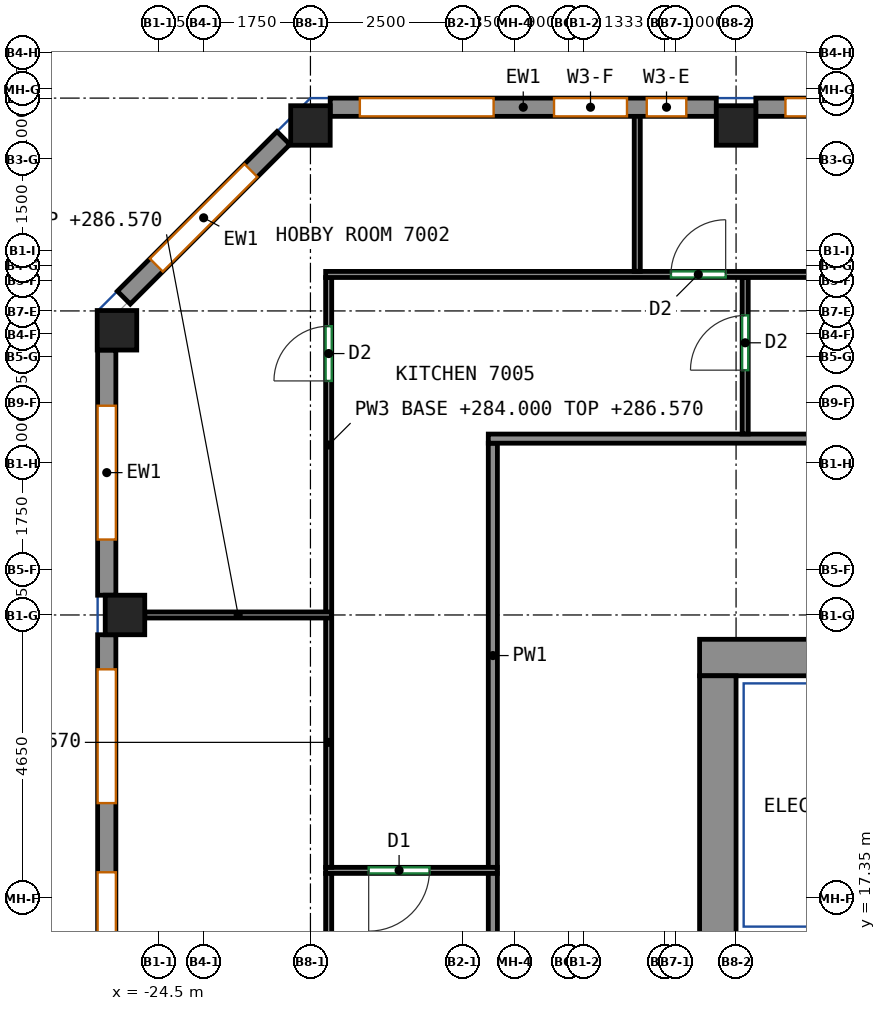
"""IFC4 building model, lengths in metres.
Left out: names, types, materials, properties, quantities, classifications, styles, units other than length and angle.
Written with IfcOpenShell. Run it as: python <this file> out.ifc"""

import sys

from ifc_helpers import new_model, si_unit, direction, frame, frame_2d, origin, origin_2d, place, context, subcontext, project, spatial, rectangle, extrude, source, transform, mapped, element, fill, save


model = new_model("IFC4")
c1 = context("Model", 3, precision=1e-05, world=origin(), true_north=direction((0.0, 1.0)))
c2 = subcontext(c1, "Body", "Model", "MODEL_VIEW")
j1 = project(units=[si_unit("LENGTHUNIT", "METRE"), si_unit("PLANEANGLEUNIT", "RADIAN")], contexts=[c1])
p1 = place(None, origin())
s1 = spatial("IfcSite", under=j1, at=p1, CompositionType="ELEMENT")
p2 = place(p1, origin())
s2 = spatial("IfcBuilding", under=s1, at=p2, CompositionType="ELEMENT")
p3 = place(p2, frame((0.0, 0.0, 284.0)))
s3 = spatial("IfcBuildingStorey", under=s2, at=p3, CompositionType="ELEMENT", Elevation=284.0)
m1 = source(origin(), c2, "Body", "SweptSolid", [
    extrude(rectangle(XDim=0.65, YDim=0.65, at=origin_2d()), origin(), (0.0, 0.0, 1.0), 3.12),
])
for number, where, z_axis, x_axis in (
    (1, (-25.182, 26.682, 0.0), (0.0, 0.0, 1.0), (1.0, 0.0, 0.0)),
    (2, (-25.05, 22.0, 0.0), (0.0, 0.0, 1.0), (1.0, 0.0, 0.0)),
    (3, (-22.0, 30.05, 0.0), (0.0, 0.0, 1.0), (1.0, 0.0, 0.0)),
    (4, (-15.0, 30.05, 0.0), (0.0, 0.0, 1.0), (1.0, 0.0, 0.0)),
):
    element("IfcColumn", number, at=place(p3, frame(where, z_axis=z_axis, x_axis=x_axis)), inside=s3, PredefinedType="COLUMN", context=c2, shape_type="MappedRepresentation", body=[
        mapped(m1, transform((0.0, 0.0, 0.0))),
    ])
m2 = source(origin(), c2, "Body", "SweptSolid", [
    extrude(rectangle(XDim=33.3, YDim=0.6, at=frame_2d((16.65, 0.0))), origin(), (0.0, 0.0, 1.0), 3.12),
])
p4 = place(p3, frame((-15.6, 21.3, 0.0), z_axis=(0.0, 0.0, 1.0), x_axis=(1.0, 0.0, 0.0)))
e5 = element("IfcWall", 5, at=p4, inside=s3, PredefinedType="SHEAR", context=c2, shape_type="MappedRepresentation", body=[
    mapped(m2, transform((0.0, 0.0, 0.0))),
])
p5 = place(p4, frame((6.431, 0.0, 0.0)))
e6 = element("IfcOpeningElement", 6, at=p5, cuts=e5, PredefinedType="OPENING", context=c2, shape_type="SweptSolid", body=[
    extrude(rectangle(XDim=0.9, YDim=2.1, at=frame_2d((0.45, 1.05))), frame((0.0, 0.31, 0.0), z_axis=(0.0, -1.0, 0.0), x_axis=(1.0, 0.0, 0.0)), (0.0, 0.0, 1.0), 0.62),
])
p6 = place(p4, frame((11.738, 0.0, 0.0)))
e7 = element("IfcOpeningElement", 7, at=p6, cuts=e5, PredefinedType="OPENING", context=c2, shape_type="SweptSolid", body=[
    extrude(rectangle(XDim=0.9, YDim=2.1, at=frame_2d((0.45, 1.05))), frame((0.0, 0.31, 0.0), z_axis=(0.0, -1.0, 0.0), x_axis=(1.0, 0.0, 0.0)), (0.0, 0.0, 1.0), 0.62),
])
p7 = place(p4, frame((17.165, 0.0, 0.0)))
e8 = element("IfcOpeningElement", 8, at=p7, cuts=e5, PredefinedType="OPENING", context=c2, shape_type="SweptSolid", body=[
    extrude(rectangle(XDim=0.9, YDim=2.1, at=frame_2d((0.45, 1.05))), frame((0.0, 0.31, 0.0), z_axis=(0.0, -1.0, 0.0), x_axis=(1.0, 0.0, 0.0)), (0.0, 0.0, 1.0), 0.62),
])
p8 = place(p4, frame((21.386, 0.0, 0.0)))
e9 = element("IfcOpeningElement", 9, at=p8, cuts=e5, PredefinedType="OPENING", context=c2, shape_type="SweptSolid", body=[
    extrude(rectangle(XDim=0.9, YDim=2.1, at=frame_2d((0.45, 1.05))), frame((0.0, 0.31, 0.0), z_axis=(0.0, -1.0, 0.0), x_axis=(1.0, 0.0, 0.0)), (0.0, 0.0, 1.0), 0.62),
])
p9 = place(p4, frame((24.387, 0.0, 0.0)))
e10 = element("IfcOpeningElement", 10, at=p9, cuts=e5, PredefinedType="OPENING", context=c2, shape_type="SweptSolid", body=[
    extrude(rectangle(XDim=0.9, YDim=2.1, at=frame_2d((0.45, 1.05))), frame((0.0, 0.31, 0.0), z_axis=(0.0, -1.0, 0.0), x_axis=(1.0, 0.0, 0.0)), (0.0, 0.0, 1.0), 0.62),
])
p10 = place(p4, frame((26.92, 0.0, 0.0)))
e11 = element("IfcOpeningElement", 11, at=p10, cuts=e5, PredefinedType="OPENING", context=c2, shape_type="SweptSolid", body=[
    extrude(rectangle(XDim=0.9, YDim=2.1, at=frame_2d((0.45, 1.05))), frame((0.0, 0.31, 0.0), z_axis=(0.0, -1.0, 0.0), x_axis=(1.0, 0.0, 0.0)), (0.0, 0.0, 1.0), 0.62),
])
p11 = place(p4, frame((2.125, 0.0, 0.0)))
e12 = element("IfcOpeningElement", 12, at=p11, cuts=e5, PredefinedType="OPENING", context=c2, shape_type="SweptSolid", body=[
    extrude(rectangle(XDim=0.9, YDim=2.1, at=frame_2d((0.45, 1.05))), frame((0.0, 0.31, 0.0), z_axis=(0.0, -1.0, 0.0), x_axis=(1.0, 0.0, 0.0)), (0.0, 0.0, 1.0), 0.62),
])
p12 = place(p4, frame((30.275, 0.0, 0.0)))
e13 = element("IfcOpeningElement", 13, at=p12, cuts=e5, PredefinedType="OPENING", context=c2, shape_type="SweptSolid", body=[
    extrude(rectangle(XDim=0.9, YDim=2.1, at=frame_2d((0.45, 1.05))), frame((0.0, 0.31, 0.0), z_axis=(0.0, -1.0, 0.0), x_axis=(1.0, 0.0, 0.0)), (0.0, 0.0, 1.0), 0.62),
])
m3 = source(origin(), c2, "Body", "SweptSolid", [
    extrude(rectangle(XDim=12.0, YDim=0.6, at=frame_2d((6.0, 0.0))), origin(), (0.0, 0.0, 1.0), 3.12),
])
p13 = place(p3, frame((-15.3, 9.0, 0.0), z_axis=(0.0, 0.0, 1.0), x_axis=(0.0, 1.0, 0.0)))
e14 = element("IfcWall", 14, at=p13, inside=s3, PredefinedType="SHEAR", context=c2, shape_type="MappedRepresentation", body=[
    mapped(m3, transform((0.0, 0.0, 0.0))),
])
m4 = source(origin(), c2, "Body", "SweptSolid", [
    extrude(rectangle(XDim=6.35, YDim=0.3, at=frame_2d((3.175, 0.0))), origin(), (0.0, 0.0, 1.0), 3.12),
])
p14 = place(p3, frame((-8.325, 30.35, 0.0), z_axis=(0.0, 0.0, 1.0), x_axis=(-1.0, 0.0, 0.0)))
e15 = element("IfcWall", 15, at=p14, inside=s3, PredefinedType="SOLIDWALL", context=c2, shape_type="MappedRepresentation", body=[
    mapped(m4, transform((0.0, 0.0, 0.0))),
])
p15 = place(p14, frame((0.488, 0.0, 0.8)))
e16 = element("IfcOpeningElement", 16, at=p15, cuts=e15, PredefinedType="OPENING", context=c2, shape_type="SweptSolid", body=[
    extrude(rectangle(XDim=2.2, YDim=2.05, at=frame_2d((1.1, 1.025))), frame((0.0, 0.16, 0.0), z_axis=(0.0, -1.0, 0.0), x_axis=(1.0, 0.0, 0.0)), (0.0, 0.0, 1.0), 0.32),
])
p16 = place(p14, frame((3.663, 0.0, 0.8)))
e17 = element("IfcOpeningElement", 17, at=p16, cuts=e15, PredefinedType="OPENING", context=c2, shape_type="SweptSolid", body=[
    extrude(rectangle(XDim=2.2, YDim=2.05, at=frame_2d((1.1, 1.025))), frame((0.0, 0.16, 0.0), z_axis=(0.0, -1.0, 0.0), x_axis=(1.0, 0.0, 0.0)), (0.0, 0.0, 1.0), 0.32),
])
p17 = place(p3, frame((-15.325, 30.35, 0.0), z_axis=(0.0, 0.0, 1.0), x_axis=(-1.0, 0.0, 0.0)))
e18 = element("IfcWall", 18, at=p17, inside=s3, PredefinedType="SOLIDWALL", context=c2, shape_type="MappedRepresentation", body=[
    mapped(m4, transform((0.0, 0.0, 0.0))),
])
p18 = place(p17, frame((0.494, 0.0, 0.8)))
e19 = element("IfcOpeningElement", 19, at=p18, cuts=e18, PredefinedType="OPENING", context=c2, shape_type="SweptSolid", body=[
    extrude(rectangle(XDim=0.65, YDim=2.05, at=frame_2d((0.325, 1.025))), frame((0.0, 0.16, 0.0), z_axis=(0.0, -1.0, 0.0), x_axis=(1.0, 0.0, 0.0)), (0.0, 0.0, 1.0), 0.32),
])
p19 = place(p17, frame((3.663, 0.0, 0.8)))
e20 = element("IfcOpeningElement", 20, at=p19, cuts=e18, PredefinedType="OPENING", context=c2, shape_type="SweptSolid", body=[
    extrude(rectangle(XDim=2.2, YDim=2.05, at=frame_2d((1.1, 1.025))), frame((0.0, 0.16, 0.0), z_axis=(0.0, -1.0, 0.0), x_axis=(1.0, 0.0, 0.0)), (0.0, 0.0, 1.0), 0.32),
])
p20 = place(p17, frame((1.469, 0.0, 0.8)))
e21 = element("IfcOpeningElement", 21, at=p20, cuts=e18, PredefinedType="OPENING", context=c2, shape_type="SweptSolid", body=[
    extrude(rectangle(XDim=1.2, YDim=2.05, at=frame_2d((0.6, 1.025))), frame((0.0, 0.16, 0.0), z_axis=(0.0, -1.0, 0.0), x_axis=(1.0, 0.0, 0.0)), (0.0, 0.0, 1.0), 0.32),
])
m5 = source(origin(), c2, "Body", "SweptSolid", [
    extrude(rectangle(XDim=3.712, YDim=0.3, at=frame_2d((1.856, 0.0))), origin(), (0.0, 0.0, 1.0), 3.12),
])
p21 = place(p3, frame((-22.444, 29.844, 0.0), z_axis=(0.0, 0.0, 1.0), x_axis=(-0.707106781187, -0.707106781187, 0.0)))
e22 = element("IfcWall", 22, at=p21, inside=s3, PredefinedType="SOLIDWALL", context=c2, shape_type="MappedRepresentation", body=[
    mapped(m5, transform((0.0, 0.0, 0.0))),
])
p22 = place(p21, frame((0.756, 0.0, 0.8)))
e23 = element("IfcOpeningElement", 23, at=p22, cuts=e22, PredefinedType="OPENING", context=c2, shape_type="SweptSolid", body=[
    extrude(rectangle(XDim=2.2, YDim=2.05, at=frame_2d((1.1, 1.025))), frame((0.0, 0.16, 0.0), z_axis=(0.0, -1.0, 0.0), x_axis=(1.0, 0.0, 0.0)), (0.0, 0.0, 1.0), 0.32),
])
m6 = source(origin(), c2, "Body", "SweptSolid", [
    extrude(rectangle(XDim=4.032, YDim=0.3, at=frame_2d((2.016, 0.0))), origin(), (0.0, 0.0, 1.0), 3.12),
])
p23 = place(p3, frame((-25.35, 26.357, 0.0), z_axis=(0.0, 0.0, 1.0), x_axis=(0.0, -1.0, 0.0)))
e24 = element("IfcWall", 24, at=p23, inside=s3, PredefinedType="SOLIDWALL", context=c2, shape_type="MappedRepresentation", body=[
    mapped(m6, transform((0.0, 0.0, 0.0))),
])
p24 = place(p23, frame((0.916, 0.0, 0.8)))
e25 = element("IfcOpeningElement", 25, at=p24, cuts=e24, PredefinedType="OPENING", context=c2, shape_type="SweptSolid", body=[
    extrude(rectangle(XDim=2.2, YDim=2.05, at=frame_2d((1.1, 1.025))), frame((0.0, 0.16, 0.0), z_axis=(0.0, -1.0, 0.0), x_axis=(1.0, 0.0, 0.0)), (0.0, 0.0, 1.0), 0.32),
])
m7 = source(origin(), c2, "Body", "SweptSolid", [
    extrude(rectangle(XDim=13.35, YDim=0.3, at=frame_2d((6.675, 0.0))), origin(), (0.0, 0.0, 1.0), 3.12),
])
p25 = place(p3, frame((-25.35, 21.675, 0.0), z_axis=(0.0, 0.0, 1.0), x_axis=(0.0, -1.0, 0.0)))
e26 = element("IfcWall", 26, at=p25, inside=s3, PredefinedType="SOLIDWALL", context=c2, shape_type="MappedRepresentation", body=[
    mapped(m7, transform((0.0, 0.0, 0.0))),
])
p26 = place(p25, frame((0.569, 0.0, 0.8)))
e27 = element("IfcOpeningElement", 27, at=p26, cuts=e26, PredefinedType="OPENING", context=c2, shape_type="SweptSolid", body=[
    extrude(rectangle(XDim=2.2, YDim=2.05, at=frame_2d((1.1, 1.025))), frame((0.0, 0.16, 0.0), z_axis=(0.0, -1.0, 0.0), x_axis=(1.0, 0.0, 0.0)), (0.0, 0.0, 1.0), 0.32),
])
p27 = place(p25, frame((3.906, 0.0, 0.8)))
e28 = element("IfcOpeningElement", 28, at=p27, cuts=e26, PredefinedType="OPENING", context=c2, shape_type="SweptSolid", body=[
    extrude(rectangle(XDim=2.2, YDim=2.05, at=frame_2d((1.1, 1.025))), frame((0.0, 0.16, 0.0), z_axis=(0.0, -1.0, 0.0), x_axis=(1.0, 0.0, 0.0)), (0.0, 0.0, 1.0), 0.32),
])
p28 = place(p25, frame((7.244, 0.0, 0.8)))
e29 = element("IfcOpeningElement", 29, at=p28, cuts=e26, PredefinedType="OPENING", context=c2, shape_type="SweptSolid", body=[
    extrude(rectangle(XDim=2.2, YDim=2.05, at=frame_2d((1.1, 1.025))), frame((0.0, 0.16, 0.0), z_axis=(0.0, -1.0, 0.0), x_axis=(1.0, 0.0, 0.0)), (0.0, 0.0, 1.0), 0.32),
])
p29 = place(p25, frame((10.581, 0.0, 0.8)))
e30 = element("IfcOpeningElement", 30, at=p29, cuts=e26, PredefinedType="OPENING", context=c2, shape_type="SweptSolid", body=[
    extrude(rectangle(XDim=2.2, YDim=2.05, at=frame_2d((1.1, 1.025))), frame((0.0, 0.16, 0.0), z_axis=(0.0, -1.0, 0.0), x_axis=(1.0, 0.0, 0.0)), (0.0, 0.0, 1.0), 0.32),
])
p30 = place(p3, frame((-19.0, 8.09, 0.0), z_axis=(0.0, 0.0, 1.0), x_axis=(0.0, 1.0, 0.0)))
e31 = element("IfcWall", 31, at=p30, inside=s3, PredefinedType="PARTITIONING", context=c2, shape_type="SweptSolid", body=[
    extrude(rectangle(XDim=9.67, YDim=0.15, at=frame_2d((4.835, 0.0))), origin(), (0.0, 0.0, 1.0), 3.12),
])
p31 = place(p30, frame((3.629, 0.0, 0.0)))
e32 = element("IfcOpeningElement", 32, at=p31, cuts=e31, PredefinedType="OPENING", context=c2, shape_type="SweptSolid", body=[
    extrude(rectangle(XDim=1.0, YDim=2.1, at=frame_2d((0.5, 1.05))), frame((0.0, 0.085, 0.0), z_axis=(0.0, -1.0, 0.0), x_axis=(1.0, 0.0, 0.0)), (0.0, 0.0, 1.0), 0.17),
])
p32 = place(p3, frame((-19.0, 17.84, 0.0), z_axis=(0.0, 0.0, 1.0), x_axis=(0.0, 1.0, 0.0)))
e33 = element("IfcWall", 33, at=p32, inside=s3, PredefinedType="PARTITIONING", context=c2, shape_type="SweptSolid", body=[
    extrude(rectangle(XDim=6.985, YDim=0.15, at=frame_2d((3.492, 0.0))), origin(), (0.0, 0.0, 1.0), 3.12),
])
p33 = place(p3, frame((-19.075, 24.9, 0.0), z_axis=(0.0, 0.0, 1.0), x_axis=(1.0, 0.0, 0.0)))
e34 = element("IfcWall", 34, at=p33, inside=s3, PredefinedType="PARTITIONING", context=c2, shape_type="SweptSolid", body=[
    extrude(rectangle(XDim=39.75, YDim=0.15, at=frame_2d((19.875, 0.0))), origin(), (0.0, 0.0, 1.0), 3.12),
])
p34 = place(p33, frame((11.365, 0.0, 0.0)))
e35 = element("IfcOpeningElement", 35, at=p34, cuts=e34, PredefinedType="OPENING", context=c2, shape_type="SweptSolid", body=[
    extrude(rectangle(XDim=1.0, YDim=2.1, at=frame_2d((0.5, 1.05))), frame((0.0, 0.085, 0.0), z_axis=(0.0, -1.0, 0.0), x_axis=(1.0, 0.0, 0.0)), (0.0, 0.0, 1.0), 0.17),
])
p35 = place(p33, frame((33.379, 0.0, 0.0)))
e36 = element("IfcOpeningElement", 36, at=p35, cuts=e34, PredefinedType="OPENING", context=c2, shape_type="SweptSolid", body=[
    extrude(rectangle(XDim=0.9, YDim=2.1, at=frame_2d((0.45, 1.05))), frame((0.0, 0.085, 0.0), z_axis=(0.0, -1.0, 0.0), x_axis=(1.0, 0.0, 0.0)), (0.0, 0.0, 1.0), 0.17),
])
p36 = place(p3, frame((-18.927, 17.8, 0.0), z_axis=(0.0, 0.0, 1.0), x_axis=(-1.0, 0.0, 0.0)))
e37 = element("IfcWall", 37, at=p36, inside=s3, PredefinedType="PARTITIONING", context=c2, shape_type="SweptSolid", body=[
    extrude(rectangle(XDim=2.823, YDim=0.1, at=frame_2d((1.412, 0.0))), origin(), (0.0, 0.0, 1.0), 3.12),
])
p37 = place(p36, frame((1.115, 0.0, 0.0)))
e38 = element("IfcOpeningElement", 38, at=p37, cuts=e37, PredefinedType="OPENING", context=c2, shape_type="SweptSolid", body=[
    extrude(rectangle(XDim=1.0, YDim=2.1, at=frame_2d((0.5, 1.05))), frame((0.0, 0.06, 0.0), z_axis=(0.0, -1.0, 0.0), x_axis=(1.0, 0.0, 0.0)), (0.0, 0.0, 1.0), 0.12),
])
p38 = place(p3, frame((-21.7, 8.1, 0.0), z_axis=(0.0, 0.0, 1.0), x_axis=(0.0, 1.0, 0.0)))
e39 = element("IfcWall", 39, at=p38, inside=s3, PredefinedType="PARTITIONING", context=c2, shape_type="SweptSolid", body=[
    extrude(rectangle(XDim=9.65, YDim=0.1, at=frame_2d((4.825, 0.0))), origin(), (0.0, 0.0, 1.0), 2.57),
])
p39 = place(p38, frame((7.041, 0.0, 0.0)))
e40 = element("IfcOpeningElement", 40, at=p39, cuts=e39, PredefinedType="OPENING", context=c2, shape_type="SweptSolid", body=[
    extrude(rectangle(XDim=1.0, YDim=2.1, at=frame_2d((0.5, 1.05))), frame((0.0, 0.06, 0.0), z_axis=(0.0, -1.0, 0.0), x_axis=(1.0, 0.0, 0.0)), (0.0, 0.0, 1.0), 0.12),
])
p40 = place(p3, frame((-14.85, 24.977, 0.0), z_axis=(0.0, 0.0, 1.0), x_axis=(0.0, 1.0, 0.0)))
e41 = element("IfcWall", 41, at=p40, inside=s3, PredefinedType="PARTITIONING", context=c2, shape_type="SweptSolid", body=[
    extrude(rectangle(XDim=2.573, YDim=0.1, at=frame_2d((1.287, 0.0))), origin(), (0.0, 0.0, 1.0), 3.12),
])
p41 = place(p40, frame((1.049, 0.0, 0.0)))
e42 = element("IfcOpeningElement", 42, at=p41, cuts=e41, PredefinedType="OPENING", context=c2, shape_type="SweptSolid", body=[
    extrude(rectangle(XDim=0.9, YDim=2.1, at=frame_2d((0.45, 1.05))), frame((0.0, 0.06, 0.0), z_axis=(0.0, -1.0, 0.0), x_axis=(1.0, 0.0, 0.0)), (0.0, 0.0, 1.0), 0.12),
])
p42 = place(p3, frame((-21.7, 17.85, 0.0), z_axis=(0.0, 0.0, 1.0), x_axis=(0.0, 1.0, 0.0)))
e43 = element("IfcWall", 43, at=p42, inside=s3, PredefinedType="PARTITIONING", context=c2, shape_type="SweptSolid", body=[
    extrude(rectangle(XDim=4.11, YDim=0.1, at=frame_2d((2.055, 0.0))), origin(), (0.0, 0.0, 1.0), 2.57),
])
p43 = place(p3, frame((-21.7, 22.04, 0.0), z_axis=(0.0, 0.0, 1.0), x_axis=(0.0, 1.0, 0.0)))
e44 = element("IfcWall", 44, at=p43, inside=s3, PredefinedType="PARTITIONING", context=c2, shape_type="SweptSolid", body=[
    extrude(rectangle(XDim=5.51, YDim=0.1, at=frame_2d((2.755, 0.0))), origin(), (0.0, 0.0, 1.0), 2.57),
])
p44 = place(p43, frame((3.809, 0.0, 0.0)))
e45 = element("IfcOpeningElement", 45, at=p44, cuts=e44, PredefinedType="OPENING", context=c2, shape_type="SweptSolid", body=[
    extrude(rectangle(XDim=0.9, YDim=2.1, at=frame_2d((0.45, 1.05))), frame((0.0, 0.06, 0.0), z_axis=(0.0, -1.0, 0.0), x_axis=(1.0, 0.0, 0.0)), (0.0, 0.0, 1.0), 0.12),
])
p45 = place(p3, frame((-21.75, 27.6, 0.0), z_axis=(0.0, 0.0, 1.0), x_axis=(1.0, 0.0, 0.0)))
e46 = element("IfcWall", 46, at=p45, inside=s3, PredefinedType="PARTITIONING", context=c2, shape_type="SweptSolid", body=[
    extrude(rectangle(XDim=13.85, YDim=0.1, at=frame_2d((6.925, 0.0))), origin(), (0.0, 0.0, 1.0), 3.12),
])
p46 = place(p45, frame((5.679, 0.0, 0.0)))
e47 = element("IfcOpeningElement", 47, at=p46, cuts=e46, PredefinedType="OPENING", context=c2, shape_type="SweptSolid", body=[
    extrude(rectangle(XDim=0.9, YDim=2.1, at=frame_2d((0.45, 1.05))), frame((0.0, 0.06, 0.0), z_axis=(0.0, -1.0, 0.0), x_axis=(1.0, 0.0, 0.0)), (0.0, 0.0, 1.0), 0.12),
])
p47 = place(p3, frame((-21.652, 22.0, 0.0), z_axis=(0.0, 0.0, 1.0), x_axis=(-1.0, 0.0, 0.0)))
e48 = element("IfcWall", 48, at=p47, inside=s3, PredefinedType="PARTITIONING", context=c2, shape_type="SweptSolid", body=[
    extrude(rectangle(XDim=3.073, YDim=0.1, at=frame_2d((1.537, 0.0))), origin(), (0.0, 0.0, 1.0), 2.57),
])
p48 = place(p3, frame((-16.625, 27.652, 0.0), z_axis=(0.0, 0.0, 1.0), x_axis=(0.0, 1.0, 0.0)))
e49 = element("IfcWall", 49, at=p48, inside=s3, PredefinedType="PARTITIONING", context=c2, shape_type="SweptSolid", body=[
    extrude(rectangle(XDim=2.598, YDim=0.1, at=frame_2d((1.299, 0.0))), origin(), (0.0, 0.0, 1.0), 3.12),
])
p49 = place(p16, origin())
e50 = element("IfcWindow", 50, at=p49, inside=s3, PartitioningType="SINGLE_PANEL", PredefinedType="WINDOW", context=c2, shape_type="SweptSolid", body=[
    extrude(rectangle(XDim=2.2, YDim=2.05, at=frame_2d((1.1, 1.025))), frame((0.0, 0.03, 0.0), z_axis=(0.0, -1.0, 0.0), x_axis=(1.0, 0.0, 0.0)), (0.0, 0.0, 1.0), 0.06),
])
fill(e17, e50)
p50 = place(p18, origin())
e51 = element("IfcWindow", 51, at=p50, inside=s3, PartitioningType="SINGLE_PANEL", PredefinedType="WINDOW", context=c2, shape_type="SweptSolid", body=[
    extrude(rectangle(XDim=0.65, YDim=2.05, at=frame_2d((0.325, 1.025))), frame((0.0, 0.03, 0.0), z_axis=(0.0, -1.0, 0.0), x_axis=(1.0, 0.0, 0.0)), (0.0, 0.0, 1.0), 0.06),
])
fill(e19, e51)
p51 = place(p19, origin())
e52 = element("IfcWindow", 52, at=p51, inside=s3, PartitioningType="SINGLE_PANEL", PredefinedType="WINDOW", context=c2, shape_type="SweptSolid", body=[
    extrude(rectangle(XDim=2.2, YDim=2.05, at=frame_2d((1.1, 1.025))), frame((0.0, 0.03, 0.0), z_axis=(0.0, -1.0, 0.0), x_axis=(1.0, 0.0, 0.0)), (0.0, 0.0, 1.0), 0.06),
])
fill(e20, e52)
p52 = place(p22, origin())
e53 = element("IfcWindow", 53, at=p52, inside=s3, PartitioningType="SINGLE_PANEL", PredefinedType="WINDOW", context=c2, shape_type="SweptSolid", body=[
    extrude(rectangle(XDim=2.2, YDim=2.05, at=frame_2d((1.1, 1.025))), frame((0.0, 0.03, 0.0), z_axis=(0.0, -1.0, 0.0), x_axis=(1.0, 0.0, 0.0)), (0.0, 0.0, 1.0), 0.06),
])
fill(e23, e53)
p53 = place(p24, origin())
e54 = element("IfcWindow", 54, at=p53, inside=s3, PartitioningType="SINGLE_PANEL", PredefinedType="WINDOW", context=c2, shape_type="SweptSolid", body=[
    extrude(rectangle(XDim=2.2, YDim=2.05, at=frame_2d((1.1, 1.025))), frame((0.0, 0.03, 0.0), z_axis=(0.0, -1.0, 0.0), x_axis=(1.0, 0.0, 0.0)), (0.0, 0.0, 1.0), 0.06),
])
fill(e25, e54)
p54 = place(p26, origin())
e55 = element("IfcWindow", 55, at=p54, inside=s3, PartitioningType="SINGLE_PANEL", PredefinedType="WINDOW", context=c2, shape_type="SweptSolid", body=[
    extrude(rectangle(XDim=2.2, YDim=2.05, at=frame_2d((1.1, 1.025))), frame((0.0, 0.03, 0.0), z_axis=(0.0, -1.0, 0.0), x_axis=(1.0, 0.0, 0.0)), (0.0, 0.0, 1.0), 0.06),
])
fill(e27, e55)
p55 = place(p27, origin())
e56 = element("IfcWindow", 56, at=p55, inside=s3, PartitioningType="SINGLE_PANEL", PredefinedType="WINDOW", context=c2, shape_type="SweptSolid", body=[
    extrude(rectangle(XDim=2.2, YDim=2.05, at=frame_2d((1.1, 1.025))), frame((0.0, 0.03, 0.0), z_axis=(0.0, -1.0, 0.0), x_axis=(1.0, 0.0, 0.0)), (0.0, 0.0, 1.0), 0.06),
])
fill(e28, e56)
p56 = place(p37, origin())
e57 = element("IfcDoor", 57, at=p56, inside=s3, OperationType="SINGLE_SWING_RIGHT", PredefinedType="DOOR", context=c2, shape_type="SweptSolid", body=[
    extrude(rectangle(XDim=1.0, YDim=2.1, at=frame_2d((0.5, 1.05))), frame((0.0, 0.025, 0.0), z_axis=(0.0, -1.0, 0.0), x_axis=(1.0, 0.0, 0.0)), (0.0, 0.0, 1.0), 0.05),
])
fill(e38, e57)
p57 = place(p44, origin())
e58 = element("IfcDoor", 58, at=p57, inside=s3, OperationType="SINGLE_SWING_LEFT", PredefinedType="DOOR", context=c2, shape_type="SweptSolid", body=[
    extrude(rectangle(XDim=0.9, YDim=2.1, at=frame_2d((0.45, 1.05))), frame((0.0, 0.025, 0.0), z_axis=(0.0, -1.0, 0.0), x_axis=(1.0, 0.0, 0.0)), (0.0, 0.0, 1.0), 0.05),
])
fill(e45, e58)
p58 = place(p41, origin())
e59 = element("IfcDoor", 59, at=p58, inside=s3, OperationType="SINGLE_SWING_LEFT", PredefinedType="DOOR", context=c2, shape_type="SweptSolid", body=[
    extrude(rectangle(XDim=0.9, YDim=2.1, at=frame_2d((0.45, 1.05))), frame((0.0, 0.025, 0.0), z_axis=(0.0, -1.0, 0.0), x_axis=(1.0, 0.0, 0.0)), (0.0, 0.0, 1.0), 0.05),
])
fill(e42, e59)
p59 = place(p46, origin())
e60 = element("IfcDoor", 60, at=p59, inside=s3, OperationType="SINGLE_SWING_RIGHT", PredefinedType="DOOR", context=c2, shape_type="SweptSolid", body=[
    extrude(rectangle(XDim=0.9, YDim=2.1, at=frame_2d((0.45, 1.05))), frame((0.0, 0.025, 0.0), z_axis=(0.0, -1.0, 0.0), x_axis=(1.0, 0.0, 0.0)), (0.0, 0.0, 1.0), 0.05),
])
fill(e47, e60)
p60 = place(p20, origin())
e61 = element("IfcWindow", 61, at=p60, inside=s3, PartitioningType="SINGLE_PANEL", PredefinedType="WINDOW", context=c2, shape_type="SweptSolid", body=[
    extrude(rectangle(XDim=1.2, YDim=2.05, at=frame_2d((0.6, 1.025))), frame((0.0, 0.03, 0.0), z_axis=(0.0, -1.0, 0.0), x_axis=(1.0, 0.0, 0.0)), (0.0, 0.0, 1.0), 0.06),
])
fill(e21, e61)
save(model, sys.argv[1])
